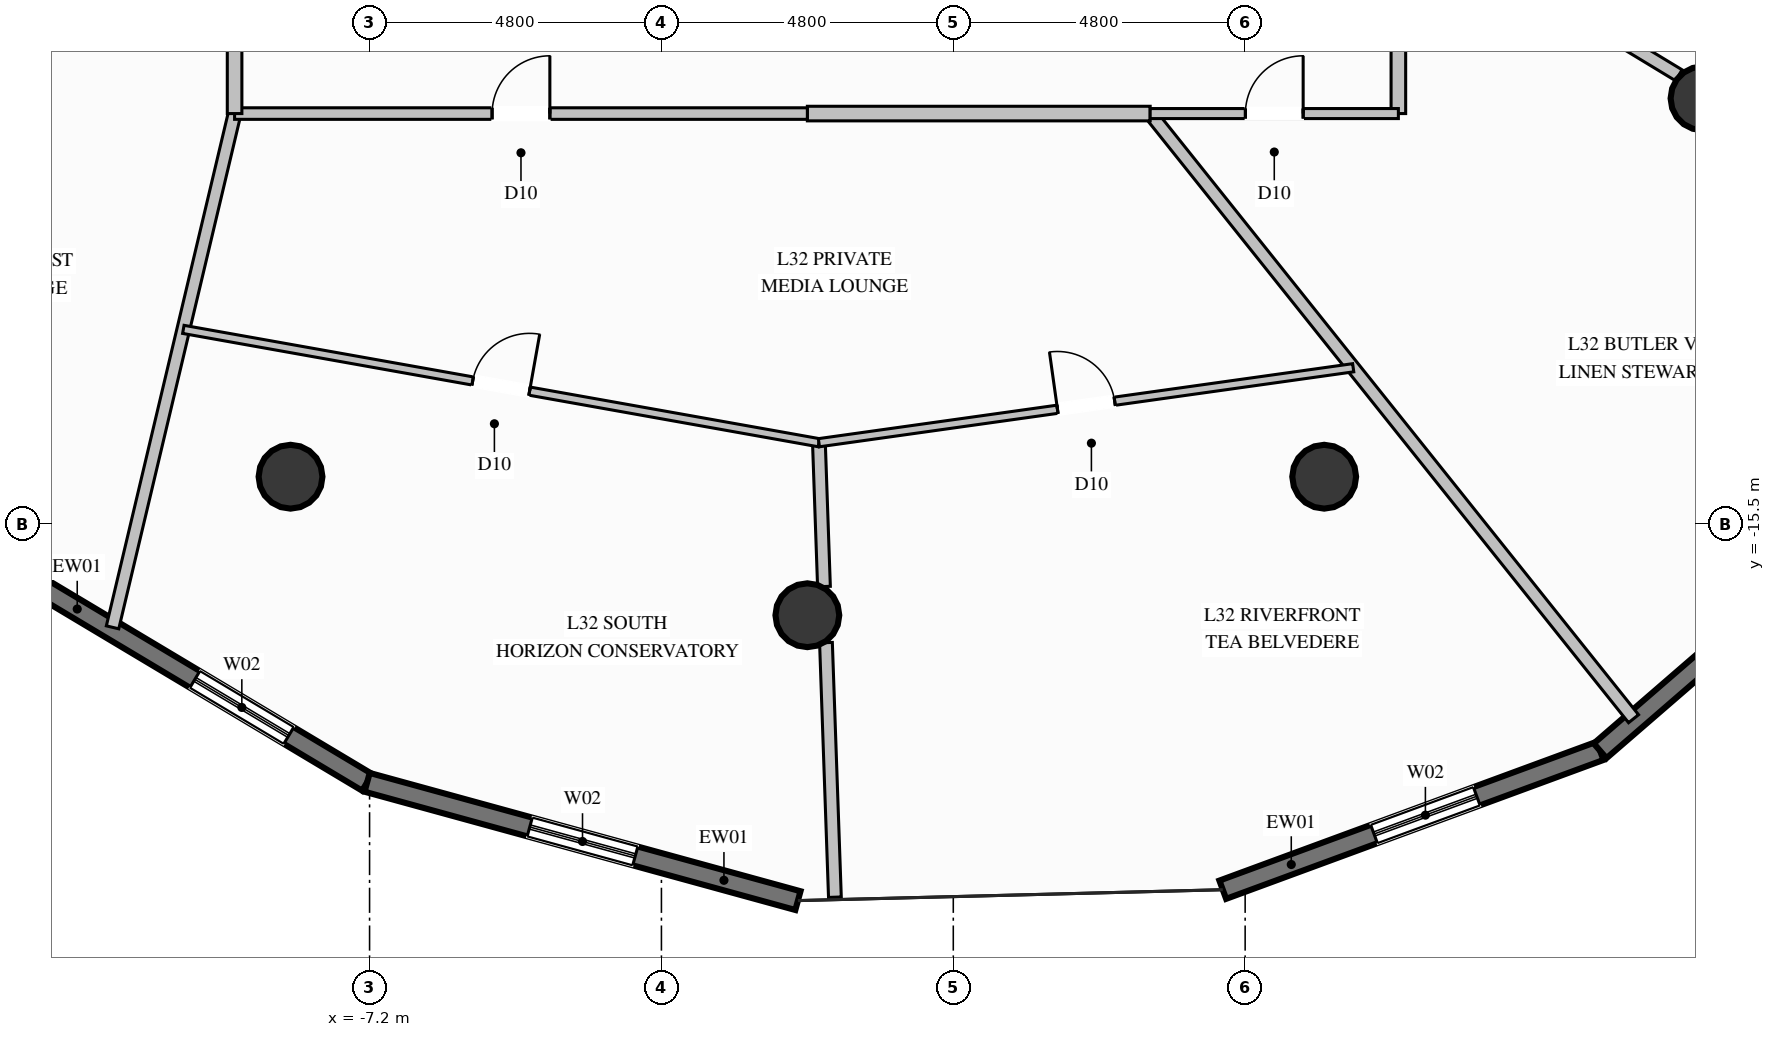
"""IFC4 building model, lengths in metres.
Left out: names, types, materials, properties, quantities, classifications, styles, units other than length and angle.
Written with IfcOpenShell. Run it as: python <this file> out.ifc"""

import sys

from ifc_helpers import new_model, si_unit, direction, frame, frame_2d, origin, origin_2d, place, context, subcontext, project, spatial, rectangle, circle, extrude, element, fill, save


model = new_model("IFC4")
c1 = context("Model", 3, precision=1e-05, world=origin(), true_north=direction((0.0, 1.0)))
c2 = subcontext(c1, "Body", "Model", "MODEL_VIEW")
j1 = project(units=[si_unit("LENGTHUNIT", "METRE"), si_unit("PLANEANGLEUNIT", "RADIAN")], contexts=[c1])
p1 = place(None, origin())
s1 = spatial("IfcSite", under=j1, at=p1, CompositionType="ELEMENT")
p2 = place(p1, origin())
s2 = spatial("IfcBuilding", under=s1, at=p2, CompositionType="ELEMENT")
p3 = place(p2, frame((0.0, 0.0, 127.8)))
s3 = spatial("IfcBuildingStorey", under=s2, at=p3, CompositionType="ELEMENT", Elevation=127.8)
for number, where, z_axis, x_axis in (
    (1, (-8.5, -14.722, 0.0), (0.0, 0.0, 1.0), (1.0, 0.0, 0.0)),
    (2, (0.0, -17.0, 0.0), (0.0, 0.0, 1.0), (1.0, 0.0, 0.0)),
    (3, (8.5, -14.722, 0.0), (0.0, 0.0, 1.0), (1.0, 0.0, 0.0)),
    (4, (14.722, -8.5, 0.0), (0.0, 0.0, 1.0), (1.0, 0.0, 0.0)),
):
    element("IfcColumn", number, at=place(p3, frame(where, z_axis=z_axis, x_axis=x_axis)), inside=s3, PredefinedType="COLUMN", context=c2, shape_type="SweptSolid", body=[
        extrude(circle(Radius=0.525, at=origin_2d()), origin(), (0.0, 0.0, 1.0), 3.6),
    ])
p4 = place(p3, frame((-7.24, -19.748, 0.0), z_axis=(0.0, 0.0, 1.0), x_axis=(-0.858360940194, 0.51304629065, 0.0)))
e5 = element("IfcWall", 5, at=p4, inside=s3, PredefinedType="SOLIDWALL", context=c2, shape_type="SweptSolid", body=[
    extrude(rectangle(XDim=7.559, YDim=0.32, at=frame_2d((3.779, 0.0))), origin(), (0.0, 0.0, 1.0), 3.35),
])
p5 = place(p4, frame((1.501, 0.0, 0.35)))
e6 = element("IfcOpeningElement", 6, at=p5, cuts=e5, PredefinedType="OPENING", context=c2, shape_type="SweptSolid", body=[
    extrude(rectangle(XDim=1.8, YDim=2.6, at=frame_2d((0.9, 1.3))), frame((0.0, 0.17, 0.0), z_axis=(0.0, -1.0, 0.0), x_axis=(1.0, 0.0, 0.0)), (0.0, 0.0, 1.0), 0.34),
])
p6 = place(p3, frame((-0.155, -21.693, 0.0), z_axis=(0.0, 0.0, 1.0), x_axis=(-0.964319993606, 0.264739400036, 0.0)))
e7 = element("IfcWall", 7, at=p6, inside=s3, PredefinedType="SOLIDWALL", context=c2, shape_type="SweptSolid", body=[
    extrude(rectangle(XDim=7.347, YDim=0.32, at=frame_2d((3.674, 0.0))), origin(), (0.0, 0.0, 1.0), 3.35),
])
p7 = place(p6, frame((2.774, 0.0, 0.35)))
e8 = element("IfcOpeningElement", 8, at=p7, cuts=e7, PredefinedType="OPENING", context=c2, shape_type="SweptSolid", body=[
    extrude(rectangle(XDim=1.8, YDim=2.6, at=frame_2d((0.9, 1.3))), frame((0.0, 0.17, 0.0), z_axis=(0.0, -1.0, 0.0), x_axis=(1.0, 0.0, 0.0)), (0.0, 0.0, 1.0), 0.34),
])
p8 = place(p3, frame((13.038, -19.23, 0.0), z_axis=(0.0, 0.0, 1.0), x_axis=(-0.938465968801, -0.345371720619, 0.0)))
e9 = element("IfcWall", 9, at=p8, inside=s3, PredefinedType="SOLIDWALL", context=c2, shape_type="SweptSolid", body=[
    extrude(rectangle(XDim=6.613, YDim=0.32, at=frame_2d((3.307, 0.0))), origin(), (0.0, 0.0, 1.0), 3.35),
])
p9 = place(p8, frame((2.162, 0.0, 0.35)))
e10 = element("IfcOpeningElement", 10, at=p9, cuts=e9, PredefinedType="OPENING", context=c2, shape_type="SweptSolid", body=[
    extrude(rectangle(XDim=1.8, YDim=2.6, at=frame_2d((0.9, 1.3))), frame((0.0, 0.17, 0.0), z_axis=(0.0, -1.0, 0.0), x_axis=(1.0, 0.0, 0.0)), (0.0, 0.0, 1.0), 0.34),
])
p10 = place(p3, frame((17.855, -15.063, 0.0), z_axis=(0.0, 0.0, 1.0), x_axis=(-0.75628320377, -0.654244385299, 0.0)))
e11 = element("IfcWall", 11, at=p10, inside=s3, PredefinedType="SOLIDWALL", context=c2, shape_type="SweptSolid", body=[
    extrude(rectangle(XDim=6.369, YDim=0.32, at=frame_2d((3.185, 0.0))), origin(), (0.0, 0.0, 1.0), 3.35),
])
p11 = place(p10, frame((2.286, 0.0, 0.35)))
e12 = element("IfcOpeningElement", 12, at=p11, cuts=e11, PredefinedType="OPENING", context=c2, shape_type="SweptSolid", body=[
    extrude(rectangle(XDim=1.8, YDim=2.6, at=frame_2d((0.9, 1.3))), frame((0.0, 0.17, 0.0), z_axis=(0.0, -1.0, 0.0), x_axis=(1.0, 0.0, 0.0)), (0.0, 0.0, 1.0), 0.34),
])
p12 = place(p3, frame((-9.42, -5.325, 0.0), z_axis=(0.0, 0.0, 1.0), x_axis=(-0.861378052692, -0.507964418381, 0.0)))
e13 = element("IfcWall", 13, at=p12, inside=s3, PredefinedType="PARTITIONING", context=c2, shape_type="SweptSolid", body=[
    extrude(rectangle(XDim=5.636, YDim=0.21, at=frame_2d((2.818, 0.0))), origin(), (0.0, 0.0, 1.0), 2.717),
])
p13 = place(p3, frame((9.72, -5.325, 0.0), z_axis=(0.0, 0.0, 1.0), x_axis=(0.855199655735, -0.518298706183, 0.0)))
e14 = element("IfcWall", 14, at=p13, inside=s3, PredefinedType="PARTITIONING", context=c2, shape_type="SweptSolid", body=[
    extrude(rectangle(XDim=5.393, YDim=0.21, at=frame_2d((2.697, 0.0))), origin(), (0.0, 0.0, 1.0), 2.717),
])
p14 = place(p3, frame((5.638, -8.75, 0.0), z_axis=(0.0, 0.0, 1.0), x_axis=(0.624140912071, -0.781311795558, 0.0)))
e15 = element("IfcWall", 15, at=p14, inside=s3, PredefinedType="PARTITIONING", context=c2, shape_type="SweptSolid", body=[
    extrude(rectangle(XDim=12.738, YDim=0.21, at=frame_2d((6.369, 0.0))), origin(), (0.0, 0.0, 1.0), 3.35),
])
p15 = place(p3, frame((-9.42, -8.75, 0.0), z_axis=(0.0, 0.0, 1.0), x_axis=(-0.231121330831, -0.972924935663, 0.0)))
e16 = element("IfcWall", 16, at=p15, inside=s3, PredefinedType="PARTITIONING", context=c2, shape_type="SweptSolid", body=[
    extrude(rectangle(XDim=8.684, YDim=0.21, at=frame_2d((4.342, 0.0))), origin(), (0.0, 0.0, 1.0), 3.35),
])
p16 = place(p3, frame((0.0, -8.75, 0.0), z_axis=(0.0, 0.0, 1.0), x_axis=(1.0, 0.0, 0.0)))
e17 = element("IfcWall", 17, at=p16, inside=s3, PredefinedType="PARTITIONING", context=c2, shape_type="SweptSolid", body=[
    extrude(rectangle(XDim=5.638, YDim=0.24, at=frame_2d((2.819, 0.0))), origin(), (0.0, 0.0, 1.0), 3.35),
])
p17 = place(p3, frame((-9.42, -8.75, 0.0), z_axis=(0.0, 0.0, 1.0), x_axis=(1.0, 0.0, 0.0)))
e18 = element("IfcWall", 18, at=p17, inside=s3, PredefinedType="PARTITIONING", context=c2, shape_type="SweptSolid", body=[
    extrude(rectangle(XDim=9.42, YDim=0.19, at=frame_2d((4.71, 0.0))), origin(), (0.0, 0.0, 1.0), 3.35),
])
p18 = place(p17, frame((4.235, 0.0, 0.0)))
e19 = element("IfcOpeningElement", 19, at=p18, cuts=e18, PredefinedType="OPENING", context=c2, shape_type="SweptSolid", body=[
    extrude(rectangle(XDim=0.95, YDim=2.1, at=frame_2d((0.475, 1.05))), frame((0.0, 0.105, 0.0), z_axis=(0.0, -1.0, 0.0), x_axis=(1.0, 0.0, 0.0)), (0.0, 0.0, 1.0), 0.21),
])
p19 = place(p3, frame((-9.42, -5.325, 0.0), z_axis=(0.0, 0.0, 1.0), x_axis=(0.0, -1.0, 0.0)))
e20 = element("IfcWall", 20, at=p19, inside=s3, PredefinedType="PARTITIONING", context=c2, shape_type="SweptSolid", body=[
    extrude(rectangle(XDim=3.425, YDim=0.24, at=frame_2d((1.712, 0.0))), origin(), (0.0, 0.0, 1.0), 3.35),
])
p20 = place(p19, frame((1.212, 0.0, 0.0)))
e21 = element("IfcOpeningElement", 21, at=p20, cuts=e20, PredefinedType="OPENING", context=c2, shape_type="SweptSolid", body=[
    extrude(rectangle(XDim=1.0, YDim=2.2, at=frame_2d((0.5, 1.1))), frame((0.0, 0.13, 0.0), z_axis=(0.0, -1.0, 0.0), x_axis=(1.0, 0.0, 0.0)), (0.0, 0.0, 1.0), 0.26),
])
p21 = place(p3, frame((0.19, -14.163, 0.0), z_axis=(0.0, 0.0, 1.0), x_axis=(0.035076986526, -0.999384613158, 0.0)))
e22 = element("IfcWall", 22, at=p21, inside=s3, PredefinedType="PARTITIONING", context=c2, shape_type="SweptSolid", body=[
    extrude(rectangle(XDim=2.366, YDim=0.21, at=frame_2d((1.183, 0.0))), origin(), (0.0, 0.0, 1.0), 3.35),
])
p22 = place(p3, frame((0.306, -17.451, 0.0), z_axis=(0.0, 0.0, 1.0), x_axis=(0.035088609093, -0.999384205154, 0.0)))
e23 = element("IfcWall", 23, at=p22, inside=s3, PredefinedType="PARTITIONING", context=c2, shape_type="SweptSolid", body=[
    extrude(rectangle(XDim=4.189, YDim=0.21, at=frame_2d((2.094, 0.0))), origin(), (0.0, 0.0, 1.0), 3.35),
])
p23 = place(p3, frame((-10.263, -12.299, 0.0), z_axis=(0.0, 0.0, 1.0), x_axis=(0.984469470269, -0.175555866063, 0.0)))
e24 = element("IfcWall", 24, at=p23, inside=s3, PredefinedType="PARTITIONING", context=c2, shape_type="SweptSolid", body=[
    extrude(rectangle(XDim=10.618, YDim=0.135, at=frame_2d((5.309, 0.0))), origin(), (0.0, 0.0, 1.0), 3.35),
])
p24 = place(p23, frame((4.834, 0.0, 0.0)))
e25 = element("IfcOpeningElement", 25, at=p24, cuts=e24, PredefinedType="OPENING", context=c2, shape_type="SweptSolid", body=[
    extrude(rectangle(XDim=0.95, YDim=2.1, at=frame_2d((0.475, 1.05))), frame((0.0, 0.078, 0.0), z_axis=(0.0, -1.0, 0.0), x_axis=(1.0, 0.0, 0.0)), (0.0, 0.0, 1.0), 0.155),
])
p25 = place(p3, frame((0.19, -14.163, 0.0), z_axis=(0.0, 0.0, 1.0), x_axis=(0.990295903808, 0.138974900259, 0.0)))
e26 = element("IfcWall", 26, at=p25, inside=s3, PredefinedType="PARTITIONING", context=c2, shape_type="SweptSolid", body=[
    extrude(rectangle(XDim=8.873, YDim=0.135, at=frame_2d((4.437, 0.0))), origin(), (0.0, 0.0, 1.0), 3.35),
])
p26 = place(p25, frame((3.962, 0.0, 0.0)))
e27 = element("IfcOpeningElement", 27, at=p26, cuts=e26, PredefinedType="OPENING", context=c2, shape_type="SweptSolid", body=[
    extrude(rectangle(XDim=0.95, YDim=2.1, at=frame_2d((0.475, 1.05))), frame((0.0, 0.078, 0.0), z_axis=(0.0, -1.0, 0.0), x_axis=(1.0, 0.0, 0.0)), (0.0, 0.0, 1.0), 0.155),
])
p27 = place(p3, frame((9.72, -8.75, 0.0), z_axis=(0.0, 0.0, 1.0), x_axis=(0.0, 1.0, 0.0)))
e28 = element("IfcWall", 28, at=p27, inside=s3, PredefinedType="PARTITIONING", context=c2, shape_type="SweptSolid", body=[
    extrude(rectangle(XDim=3.425, YDim=0.24, at=frame_2d((1.712, 0.0))), origin(), (0.0, 0.0, 1.0), 3.35),
])
p28 = place(p3, frame((5.638, -8.75, 0.0), z_axis=(0.0, 0.0, 1.0), x_axis=(1.0, 0.0, 0.0)))
e29 = element("IfcWall", 29, at=p28, inside=s3, PredefinedType="PARTITIONING", context=c2, shape_type="SweptSolid", body=[
    extrude(rectangle(XDim=4.082, YDim=0.165, at=frame_2d((2.041, 0.0))), origin(), (0.0, 0.0, 1.0), 3.35),
])
p29 = place(p28, frame((1.566, 0.0, 0.0)))
e30 = element("IfcOpeningElement", 30, at=p29, cuts=e29, PredefinedType="OPENING", context=c2, shape_type="SweptSolid", body=[
    extrude(rectangle(XDim=0.95, YDim=2.1, at=frame_2d((0.475, 1.05))), frame((0.0, 0.093, 0.0), z_axis=(0.0, -1.0, 0.0), x_axis=(1.0, 0.0, 0.0)), (0.0, 0.0, 1.0), 0.185),
])
p30 = place(p5, origin())
e31 = element("IfcWindow", 31, at=p30, inside=s3, PartitioningType="SINGLE_PANEL", PredefinedType="WINDOW", context=c2, shape_type="SweptSolid", body=[
    extrude(rectangle(XDim=1.8, YDim=2.6, at=frame_2d((0.9, 1.3))), frame((0.0, 0.03, 0.0), z_axis=(0.0, -1.0, 0.0), x_axis=(1.0, 0.0, 0.0)), (0.0, 0.0, 1.0), 0.06),
])
fill(e6, e31)
p31 = place(p7, origin())
e32 = element("IfcWindow", 32, at=p31, inside=s3, PartitioningType="SINGLE_PANEL", PredefinedType="WINDOW", context=c2, shape_type="SweptSolid", body=[
    extrude(rectangle(XDim=1.8, YDim=2.6, at=frame_2d((0.9, 1.3))), frame((0.0, 0.03, 0.0), z_axis=(0.0, -1.0, 0.0), x_axis=(1.0, 0.0, 0.0)), (0.0, 0.0, 1.0), 0.06),
])
fill(e8, e32)
p32 = place(p9, origin())
e33 = element("IfcWindow", 33, at=p32, inside=s3, PartitioningType="SINGLE_PANEL", PredefinedType="WINDOW", context=c2, shape_type="SweptSolid", body=[
    extrude(rectangle(XDim=1.8, YDim=2.6, at=frame_2d((0.9, 1.3))), frame((0.0, 0.03, 0.0), z_axis=(0.0, -1.0, 0.0), x_axis=(1.0, 0.0, 0.0)), (0.0, 0.0, 1.0), 0.06),
])
fill(e10, e33)
p33 = place(p18, origin())
e34 = element("IfcDoor", 34, at=p33, inside=s3, OperationType="SINGLE_SWING_RIGHT", PredefinedType="DOOR", context=c2, shape_type="SweptSolid", body=[
    extrude(rectangle(XDim=0.95, YDim=2.1, at=frame_2d((0.475, 1.05))), frame((0.0, 0.025, 0.0), z_axis=(0.0, -1.0, 0.0), x_axis=(1.0, 0.0, 0.0)), (0.0, 0.0, 1.0), 0.05),
])
fill(e19, e34)
p34 = place(p24, origin())
e35 = element("IfcDoor", 35, at=p34, inside=s3, OperationType="SINGLE_SWING_RIGHT", PredefinedType="DOOR", context=c2, shape_type="SweptSolid", body=[
    extrude(rectangle(XDim=0.95, YDim=2.1, at=frame_2d((0.475, 1.05))), frame((0.0, 0.025, 0.0), z_axis=(0.0, -1.0, 0.0), x_axis=(1.0, 0.0, 0.0)), (0.0, 0.0, 1.0), 0.05),
])
fill(e25, e35)
p35 = place(p26, origin())
e36 = element("IfcDoor", 36, at=p35, inside=s3, OperationType="SINGLE_SWING_LEFT", PredefinedType="DOOR", context=c2, shape_type="SweptSolid", body=[
    extrude(rectangle(XDim=0.95, YDim=2.1, at=frame_2d((0.475, 1.05))), frame((0.0, 0.025, 0.0), z_axis=(0.0, -1.0, 0.0), x_axis=(1.0, 0.0, 0.0)), (0.0, 0.0, 1.0), 0.05),
])
fill(e27, e36)
p36 = place(p29, origin())
e37 = element("IfcDoor", 37, at=p36, inside=s3, OperationType="SINGLE_SWING_RIGHT", PredefinedType="DOOR", context=c2, shape_type="SweptSolid", body=[
    extrude(rectangle(XDim=0.95, YDim=2.1, at=frame_2d((0.475, 1.05))), frame((0.0, 0.025, 0.0), z_axis=(0.0, -1.0, 0.0), x_axis=(1.0, 0.0, 0.0)), (0.0, 0.0, 1.0), 0.05),
])
fill(e30, e37)
save(model, sys.argv[1])
